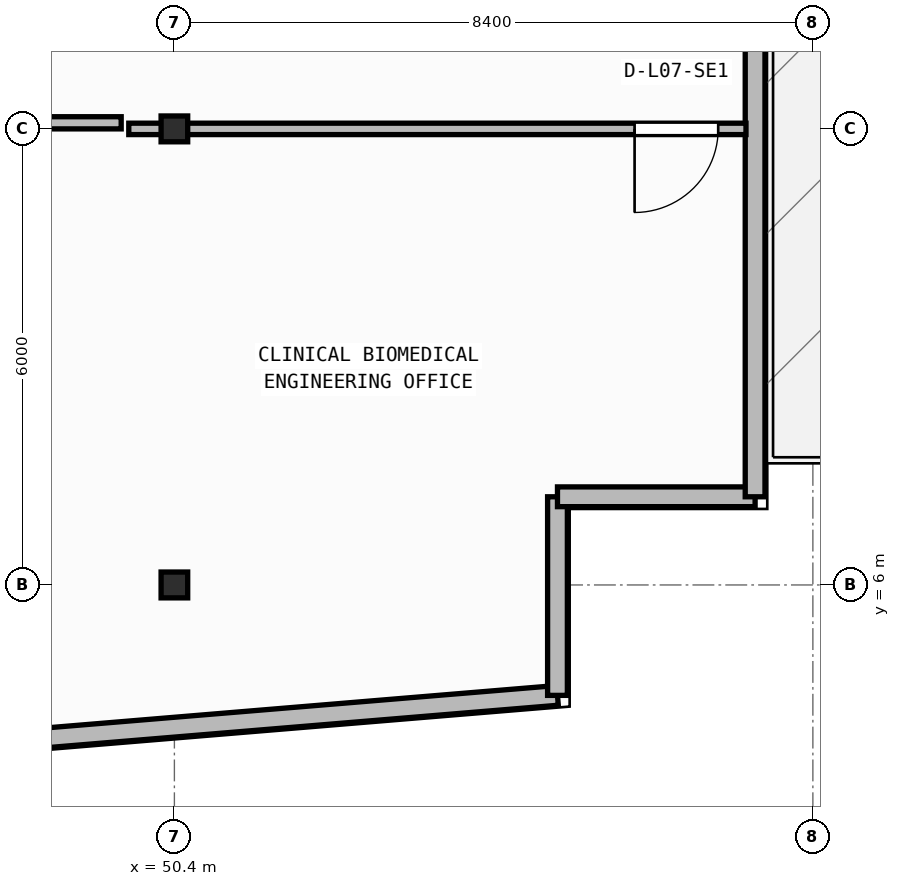
"""IFC4 building model, lengths in metres.
Left out: names, types, materials, properties, quantities, classifications, styles, units other than length and angle.
Written with IfcOpenShell. Run it as: python <this file> out.ifc"""

import sys

from ifc_helpers import new_model, si_unit, direction, frame, frame_2d, origin, origin_2d, place, context, subcontext, project, spatial, rectangle, i_section, extrude, element, fill, save


model = new_model("IFC4")
c1 = context("Model", 3, precision=1e-05, world=origin(), true_north=direction((0.0, 1.0)))
c2 = subcontext(c1, "Body", "Model", "MODEL_VIEW")
j1 = project(units=[si_unit("LENGTHUNIT", "METRE"), si_unit("PLANEANGLEUNIT", "RADIAN")], contexts=[c1])
p1 = place(None, origin())
s1 = spatial("IfcSite", under=j1, at=p1, CompositionType="ELEMENT")
p2 = place(p1, origin())
s2 = spatial("IfcBuilding", under=s1, at=p2, CompositionType="ELEMENT")
p3 = place(p2, frame((0.0, 0.0, 30.4)))
s3 = spatial("IfcBuildingStorey", under=s2, at=p3, CompositionType="ELEMENT", Elevation=30.4)
for number, where, z_axis, x_axis in (
    (1, (50.4, 6.0, 0.0), (0.0, 0.0, 1.0), (1.0, 0.0, 0.0)),
    (2, (50.4, 12.0, 0.0), (0.0, 0.0, 1.0), (1.0, 0.0, 0.0)),
):
    element("IfcColumn", number, at=place(p3, frame(where, z_axis=z_axis, x_axis=x_axis)), inside=s3, PredefinedType="COLUMN", context=c2, shape_type="SweptSolid", body=[
        extrude(i_section(OverallWidth=0.35, OverallDepth=0.34, WebThickness=0.016, FlangeThickness=0.028, at=origin_2d()), origin(), (0.0, 0.0, 1.0), 3.95),
    ])
p4 = place(p3, frame((2.76, 0.174, 0.0), z_axis=(0.0, 0.0, 1.0), x_axis=(0.996571478456, 0.082736257641, 0.0)))
e3 = element("IfcWall", 3, at=p4, inside=s3, PredefinedType="STANDARD", context=c2, shape_type="SweptSolid", body=[
    extrude(rectangle(XDim=52.861, YDim=0.26, at=frame_2d((26.431, 0.0))), origin(), (0.0, 0.0, 1.0), 3.71),
])
p5 = place(p4, frame((25.231, 0.0, 0.9)))
e4 = element("IfcOpeningElement", 4, at=p5, cuts=e3, PredefinedType="OPENING", context=c2, shape_type="SweptSolid", body=[
    extrude(rectangle(XDim=2.4, YDim=1.65, at=frame_2d((1.2, 0.825))), frame((0.0, 0.14, 0.0), z_axis=(0.0, -1.0, 0.0), x_axis=(1.0, 0.0, 0.0)), (0.0, 0.0, 1.0), 0.28),
])
p6 = place(p3, frame((55.44, 4.547, 0.0), z_axis=(0.0, 0.0, 1.0), x_axis=(0.0, 1.0, 0.0)))
e5 = element("IfcWall", 5, at=p6, inside=s3, PredefinedType="STANDARD", context=c2, shape_type="SweptSolid", body=[
    extrude(rectangle(XDim=2.613, YDim=0.26, at=frame_2d((1.306, 0.0))), origin(), (0.0, 0.0, 1.0), 3.71),
])
p7 = place(p3, frame((55.44, 7.16, 0.0), z_axis=(0.0, 0.0, 1.0), x_axis=(1.0, 0.0, 0.0)))
e6 = element("IfcWall", 6, at=p7, inside=s3, PredefinedType="STANDARD", context=c2, shape_type="SweptSolid", body=[
    extrude(rectangle(XDim=2.6, YDim=0.26, at=frame_2d((1.3, 0.0))), origin(), (0.0, 0.0, 1.0), 3.71),
])
p8 = place(p3, frame((58.04, 7.16, 0.0), z_axis=(0.0, 0.0, 1.0), x_axis=(0.0, 1.0, 0.0)))
e7 = element("IfcWall", 7, at=p8, inside=s3, PredefinedType="STANDARD", context=c2, shape_type="SweptSolid", body=[
    extrude(rectangle(XDim=24.48, YDim=0.26, at=frame_2d((12.24, 0.0))), origin(), (0.0, 0.0, 1.0), 3.71),
])
p9 = place(p8, frame((8.87, 0.0, 0.0)))
e8 = element("IfcOpeningElement", 8, at=p9, cuts=e7, PredefinedType="OPENING", context=c2, shape_type="SweptSolid", body=[
    extrude(rectangle(XDim=1.3, YDim=2.15, at=frame_2d((0.65, 1.075))), frame((0.0, 0.14, 0.0), z_axis=(0.0, -1.0, 0.0), x_axis=(1.0, 0.0, 0.0)), (0.0, 0.0, 1.0), 0.28),
])
p10 = place(p3, frame((57.92, 12.0, 0.0), z_axis=(0.0, 0.0, 1.0), x_axis=(-1.0, 0.0, 0.0)))
e9 = element("IfcWall", 9, at=p10, inside=s3, PredefinedType="PARTITIONING", context=c2, shape_type="SweptSolid", body=[
    extrude(rectangle(XDim=8.12, YDim=0.15, at=frame_2d((4.06, 0.0))), origin(), (0.0, 0.0, 1.0), 3.073),
])
p11 = place(p10, frame((0.365, 0.0, 0.0)))
e10 = element("IfcOpeningElement", 10, at=p11, cuts=e9, PredefinedType="OPENING", context=c2, shape_type="SweptSolid", body=[
    extrude(rectangle(XDim=1.1, YDim=2.1, at=frame_2d((0.55, 1.05))), frame((0.0, 0.085, 0.0), z_axis=(0.0, -1.0, 0.0), x_axis=(1.0, 0.0, 0.0)), (0.0, 0.0, 1.0), 0.17),
])
p12 = place(p3, frame((46.689, 12.08, 0.0), z_axis=(0.0, 0.0, 1.0), x_axis=(1.0, 0.0, 0.0)))
e11 = element("IfcWall", 11, at=p12, inside=s3, PredefinedType="PARTITIONING", context=c2, shape_type="SweptSolid", body=[
    extrude(rectangle(XDim=3.011, YDim=0.16, at=frame_2d((1.505, 0.0))), origin(), (0.0, 0.0, 1.0), 3.073),
])
p13 = place(p11, origin())
e12 = element("IfcDoor", 12, at=p13, inside=s3, OperationType="SINGLE_SWING_RIGHT", PredefinedType="DOOR", context=c2, shape_type="SweptSolid", body=[
    extrude(rectangle(XDim=1.1, YDim=2.1, at=frame_2d((0.55, 1.05))), frame((0.0, 0.025, 0.0), z_axis=(0.0, -1.0, 0.0), x_axis=(1.0, 0.0, 0.0)), (0.0, 0.0, 1.0), 0.05),
])
fill(e10, e12)
save(model, sys.argv[1])
